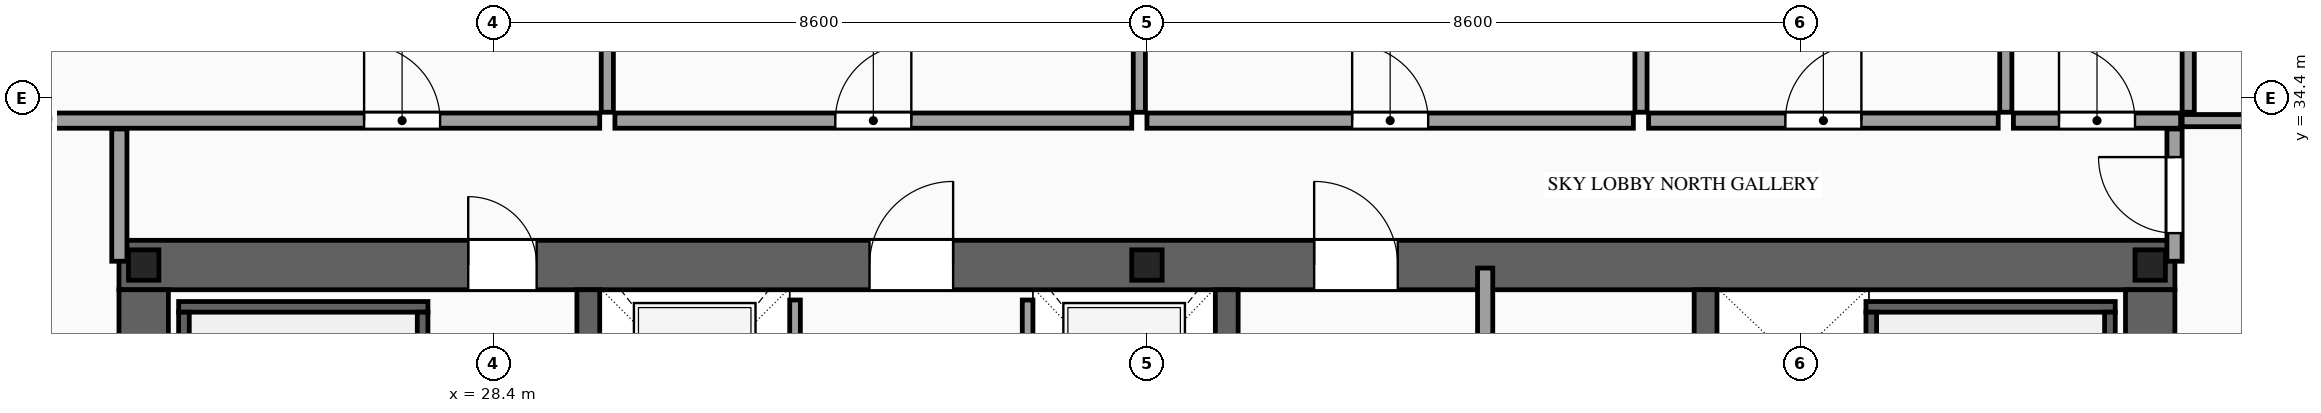
"""IFC4 building model, lengths in metres.
Left out: names, types, materials, properties, quantities, classifications, styles, units other than length and angle.
Written with IfcOpenShell. Run it as: python <this file> out.ifc"""

import sys

from ifc_helpers import new_model, si_unit, direction, frame, frame_2d, origin, origin_2d, place, context, subcontext, project, spatial, rectangle, i_section, extrude, source, transform, mapped, element, fill, save


model = new_model("IFC4")
c1 = context("Model", 3, precision=1e-05, world=origin(), true_north=direction((0.0, 1.0)))
c2 = subcontext(c1, "Body", "Model", "MODEL_VIEW")
j1 = project(units=[si_unit("LENGTHUNIT", "METRE"), si_unit("PLANEANGLEUNIT", "RADIAN")], contexts=[c1])
p1 = place(None, origin())
s1 = spatial("IfcSite", under=j1, at=p1, CompositionType="ELEMENT")
p2 = place(p1, origin())
s2 = spatial("IfcBuilding", under=s1, at=p2, CompositionType="ELEMENT")
p3 = place(p2, frame((0.0, 0.0, 171.6)))
s3 = spatial("IfcBuildingStorey", under=s2, at=p3, CompositionType="ELEMENT", Elevation=171.6)
p4 = place(p3, frame((23.475, 32.2, 0.0), z_axis=(0.0, 0.0, 1.0), x_axis=(1.0, 0.0, 0.0)))
e1 = element("IfcWall", 1, at=p4, inside=s3, PredefinedType="SHEAR", context=c2, shape_type="SweptSolid", body=[
    extrude(rectangle(XDim=27.05, YDim=0.65, at=frame_2d((13.525, 0.0))), origin(), (0.0, 0.0, 1.0), 4.8),
])
p5 = place(p4, frame((4.595, 0.0, 0.0)))
e2 = element("IfcOpeningElement", 2, at=p5, cuts=e1, PredefinedType="OPENING", context=c2, shape_type="SweptSolid", body=[
    extrude(rectangle(XDim=0.9, YDim=2.15, at=frame_2d((0.45, 1.075))), frame((0.0, 0.34, 0.0), z_axis=(0.0, -1.0, 0.0), x_axis=(1.0, 0.0, 0.0)), (0.0, 0.0, 1.0), 0.68),
])
p6 = place(p4, frame((9.875, 0.0, 0.0)))
e3 = element("IfcOpeningElement", 3, at=p6, cuts=e1, PredefinedType="OPENING", context=c2, shape_type="SweptSolid", body=[
    extrude(rectangle(XDim=1.1, YDim=2.2, at=frame_2d((0.55, 1.1))), frame((0.0, 0.34, 0.0), z_axis=(0.0, -1.0, 0.0), x_axis=(1.0, 0.0, 0.0)), (0.0, 0.0, 1.0), 0.68),
])
p7 = place(p4, frame((15.725, 0.0, 0.0)))
e4 = element("IfcOpeningElement", 4, at=p7, cuts=e1, PredefinedType="OPENING", context=c2, shape_type="SweptSolid", body=[
    extrude(rectangle(XDim=1.1, YDim=2.2, at=frame_2d((0.55, 1.1))), frame((0.0, 0.34, 0.0), z_axis=(0.0, -1.0, 0.0), x_axis=(1.0, 0.0, 0.0)), (0.0, 0.0, 1.0), 0.68),
])
m1 = source(origin(), c2, "Body", "SweptSolid", [
    extrude(rectangle(XDim=12.15, YDim=0.65, at=frame_2d((6.075, 0.0))), origin(), (0.0, 0.0, 1.0), 4.8),
])
for number, where, z_axis, x_axis in (
    (5, (23.8, 19.725, 0.0), (0.0, 0.0, 1.0), (0.0, 1.0, 0.0)),
    (6, (50.2, 19.725, 0.0), (0.0, 0.0, 1.0), (0.0, 1.0, 0.0)),
):
    element("IfcWall", number, at=place(p3, frame(where, z_axis=z_axis, x_axis=x_axis)), inside=s3, PredefinedType="SHEAR", context=c2, shape_type="MappedRepresentation", body=[
        mapped(m1, transform((0.0, 0.0, 0.0), scale=1.0)),
    ])
m2 = source(origin(), c2, "Body", "SweptSolid", [
    extrude(rectangle(XDim=12.15, YDim=0.3, at=frame_2d((6.075, 0.0))), origin(), (0.0, 0.0, 1.0), 4.8),
])
for number, where, z_axis, x_axis in (
    (7, (29.65, 19.725, 0.0), (0.0, 0.0, 1.0), (0.0, 1.0, 0.0)),
    (8, (38.05, 19.725, 0.0), (0.0, 0.0, 1.0), (0.0, 1.0, 0.0)),
    (9, (44.35, 19.725, 0.0), (0.0, 0.0, 1.0), (0.0, 1.0, 0.0)),
):
    element("IfcWall", number, at=place(p3, frame(where, z_axis=z_axis, x_axis=x_axis)), inside=s3, PredefinedType="SOLIDWALL", context=c2, shape_type="MappedRepresentation", body=[
        mapped(m2, transform((0.0, 0.0, 0.0), scale=1.0)),
    ])
m3 = source(origin(), c2, "Body", "SweptSolid", [
    extrude(i_section(OverallWidth=0.4, OverallDepth=0.4, WebThickness=0.013, FlangeThickness=0.021, at=origin_2d()), origin(), (0.0, 0.0, 1.0), 4.8),
])
for number, where, z_axis, x_axis in (
    (10, (23.8, 32.2, 0.0), (0.0, 0.0, 1.0), (1.0, 0.0, 0.0)),
    (11, (37.0, 32.2, 0.0), (0.0, 0.0, 1.0), (1.0, 0.0, 0.0)),
    (12, (50.2, 32.2, 0.0), (0.0, 0.0, 1.0), (1.0, 0.0, 0.0)),
):
    element("IfcColumn", number, at=place(p3, frame(where, z_axis=z_axis, x_axis=x_axis)), inside=s3, PredefinedType="COLUMN", context=c2, shape_type="MappedRepresentation", body=[
        mapped(m3, transform((0.0, 0.0, 0.0), scale=1.0)),
    ])
p8 = place(p3, frame((32.37, 29.4, 0.0), z_axis=(0.0, 0.0, 1.0), x_axis=(0.0, 1.0, 0.0)))
e13 = element("IfcWall", 13, at=p8, inside=s3, PredefinedType="SOLIDWALL", context=c2, shape_type="SweptSolid", body=[
    extrude(rectangle(XDim=2.34, YDim=0.14, at=frame_2d((1.17, 0.0))), origin(), (0.0, 0.0, 1.0), 4.52),
])
p9 = place(p8, frame((0.62, 0.0, 0.0)))
e14 = element("IfcOpeningElement", 14, at=p9, cuts=e13, PredefinedType="OPENING", context=c2, shape_type="SweptSolid", body=[
    extrude(rectangle(XDim=1.1, YDim=2.2, at=frame_2d((0.55, 1.1))), frame((0.0, 0.085, 0.0), z_axis=(0.0, -1.0, 0.0), x_axis=(1.0, 0.0, 0.0)), (0.0, 0.0, 1.0), 0.17),
])
p10 = place(p3, frame((35.43, 29.4, 0.0), z_axis=(0.0, 0.0, 1.0), x_axis=(0.0, 1.0, 0.0)))
e15 = element("IfcWall", 15, at=p10, inside=s3, PredefinedType="SOLIDWALL", context=c2, shape_type="SweptSolid", body=[
    extrude(rectangle(XDim=2.34, YDim=0.14, at=frame_2d((1.17, 0.0))), origin(), (0.0, 0.0, 1.0), 4.52),
])
p11 = place(p10, frame((0.62, 0.0, 0.0)))
e16 = element("IfcOpeningElement", 16, at=p11, cuts=e15, PredefinedType="OPENING", context=c2, shape_type="SweptSolid", body=[
    extrude(rectangle(XDim=1.1, YDim=2.2, at=frame_2d((0.55, 1.1))), frame((0.0, 0.085, 0.0), z_axis=(0.0, -1.0, 0.0), x_axis=(1.0, 0.0, 0.0)), (0.0, 0.0, 1.0), 0.17),
])
m4 = source(origin(), c2, "Body", "SweptSolid", [
    extrude(rectangle(XDim=3.28, YDim=0.14, at=frame_2d((1.64, 0.0))), origin(), (0.0, 0.0, 1.0), 4.52),
])
p12 = place(p3, frame((24.26, 31.65, 0.0), z_axis=(0.0, 0.0, 1.0), x_axis=(1.0, 0.0, 0.0)))
e17 = element("IfcWall", 17, at=p12, inside=s3, PredefinedType="SOLIDWALL", context=c2, shape_type="MappedRepresentation", body=[
    mapped(m4, transform((0.0, 0.0, 0.0), scale=1.0)),
])
m5 = source(origin(), c2, "Body", "SweptSolid", [
    extrude(rectangle(XDim=8.94, YDim=0.14, at=frame_2d((4.47, 0.0))), origin(), (0.0, 0.0, 1.0), 4.52),
])
for number, where, z_axis, x_axis in (
    (18, (24.33, 22.64, 0.0), (0.0, 0.0, 1.0), (0.0, 1.0, 0.0)),
    (19, (27.47, 22.64, 0.0), (0.0, 0.0, 1.0), (0.0, 1.0, 0.0)),
):
    element("IfcWall", number, at=place(p3, frame(where, z_axis=z_axis, x_axis=x_axis)), inside=s3, PredefinedType="SOLIDWALL", context=c2, shape_type="MappedRepresentation", body=[
        mapped(m5, transform((0.0, 0.0, 0.0), scale=1.0)),
    ])
p13 = place(p3, frame((46.46, 31.65, 0.0), z_axis=(0.0, 0.0, 1.0), x_axis=(1.0, 0.0, 0.0)))
e20 = element("IfcWall", 20, at=p13, inside=s3, PredefinedType="SOLIDWALL", context=c2, shape_type="MappedRepresentation", body=[
    mapped(m4, transform((0.0, 0.0, 0.0), scale=1.0)),
])
for number, where, z_axis, x_axis in (
    (21, (46.53, 22.64, 0.0), (0.0, 0.0, 1.0), (0.0, 1.0, 0.0)),
    (22, (49.67, 22.64, 0.0), (0.0, 0.0, 1.0), (0.0, 1.0, 0.0)),
):
    element("IfcWall", number, at=place(p3, frame(where, z_axis=z_axis, x_axis=x_axis)), inside=s3, PredefinedType="SOLIDWALL", context=c2, shape_type="MappedRepresentation", body=[
        mapped(m5, transform((0.0, 0.0, 0.0), scale=1.0)),
    ])
m6 = source(origin(), c2, "Body", "SweptSolid", [
    extrude(rectangle(XDim=12.72, YDim=0.2, at=frame_2d((6.36, 0.0))), origin(), (0.0, 0.0, 1.0), 4.52),
])
p14 = place(p3, frame((41.45, 19.44, 0.0), z_axis=(0.0, 0.0, 1.0), x_axis=(0.0, 1.0, 0.0)))
e23 = element("IfcWall", 23, at=p14, inside=s3, PredefinedType="PARTITIONING", context=c2, shape_type="MappedRepresentation", body=[
    mapped(m6, transform((0.0, 0.0, 0.0), scale=1.0)),
])
m7 = source(origin(), c2, "Body", "SweptSolid", [
    extrude(rectangle(XDim=1.74, YDim=0.2, at=frame_2d((0.87, 0.0))), origin(), (0.0, 0.0, 1.0), 4.52),
])
p15 = place(p3, frame((23.48, 32.25, 0.0), z_axis=(0.0, 0.0, 1.0), x_axis=(0.0, 1.0, 0.0)))
e24 = element("IfcWall", 24, at=p15, inside=s3, PredefinedType="PARTITIONING", context=c2, shape_type="MappedRepresentation", body=[
    mapped(m7, transform((0.0, 0.0, 0.0), scale=1.0)),
])
p16 = place(p3, frame((50.52, 32.25, 0.0), z_axis=(0.0, 0.0, 1.0), x_axis=(0.0, 1.0, 0.0)))
e25 = element("IfcWall", 25, at=p16, inside=s3, PredefinedType="PARTITIONING", context=c2, shape_type="SweptSolid", body=[
    extrude(rectangle(XDim=1.74, YDim=0.2, at=frame_2d((0.87, 0.0))), origin(), (0.0, 0.0, 1.0), 4.52),
])
p17 = place(p16, frame((0.37, 0.0, 0.0)))
e26 = element("IfcOpeningElement", 26, at=p17, cuts=e25, PredefinedType="OPENING", context=c2, shape_type="SweptSolid", body=[
    extrude(rectangle(XDim=1.0, YDim=2.2, at=frame_2d((0.5, 1.1))), frame((0.0, 0.115, 0.0), z_axis=(0.0, -1.0, 0.0), x_axis=(1.0, 0.0, 0.0)), (0.0, 0.0, 1.0), 0.23),
])
m8 = source(origin(), c2, "Body", "SweptSolid", [
    extrude(rectangle(XDim=8.33, YDim=0.16, at=frame_2d((4.165, 0.0))), origin(), (0.0, 0.0, 1.0), 4.52),
])
p18 = place(p3, frame((50.62, 34.1, 0.0), z_axis=(0.0, 0.0, 1.0), x_axis=(1.0, 0.0, 0.0)))
e27 = element("IfcWall", 27, at=p18, inside=s3, PredefinedType="PARTITIONING", context=c2, shape_type="MappedRepresentation", body=[
    mapped(m8, transform((0.0, 0.0, 0.0), scale=1.0)),
])
p19 = place(p3, frame((17.94, 34.1, 0.0), z_axis=(0.0, 0.0, 1.0), x_axis=(1.0, 0.0, 0.0)))
e28 = element("IfcWall", 28, at=p19, inside=s3, PredefinedType="PARTITIONING", context=c2, shape_type="SweptSolid", body=[
    extrude(rectangle(XDim=11.86, YDim=0.2, at=frame_2d((5.93, 0.0))), origin(), (0.0, 0.0, 1.0), 4.52),
])
p20 = place(p19, frame((8.76, 0.0, 0.0)))
e29 = element("IfcOpeningElement", 29, at=p20, cuts=e28, PredefinedType="OPENING", context=c2, shape_type="SweptSolid", body=[
    extrude(rectangle(XDim=1.0, YDim=2.2, at=frame_2d((0.5, 1.1))), frame((0.0, 0.115, 0.0), z_axis=(0.0, -1.0, 0.0), x_axis=(1.0, 0.0, 0.0)), (0.0, 0.0, 1.0), 0.23),
])
m9 = source(origin(), c2, "Body", "SweptSolid", [
    extrude(rectangle(XDim=13.54, YDim=0.16, at=frame_2d((6.77, 0.0))), origin(), (0.0, 0.0, 1.0), 4.52),
])
p21 = place(p3, frame((29.9, 34.21, 0.0), z_axis=(0.0, 0.0, 1.0), x_axis=(0.0, 1.0, 0.0)))
e30 = element("IfcWall", 30, at=p21, inside=s3, PredefinedType="PARTITIONING", context=c2, shape_type="MappedRepresentation", body=[
    mapped(m9, transform((0.0, 0.0, 0.0), scale=1.0)),
])
p22 = place(p3, frame((30.0, 34.1, 0.0), z_axis=(0.0, 0.0, 1.0), x_axis=(1.0, 0.0, 0.0)))
e31 = element("IfcWall", 31, at=p22, inside=s3, PredefinedType="PARTITIONING", context=c2, shape_type="SweptSolid", body=[
    extrude(rectangle(XDim=6.8, YDim=0.2, at=frame_2d((3.4, 0.0))), origin(), (0.0, 0.0, 1.0), 4.52),
])
p23 = place(p22, frame((2.9, 0.0, 0.0)))
e32 = element("IfcOpeningElement", 32, at=p23, cuts=e31, PredefinedType="OPENING", context=c2, shape_type="SweptSolid", body=[
    extrude(rectangle(XDim=1.0, YDim=2.2, at=frame_2d((0.5, 1.1))), frame((0.0, 0.115, 0.0), z_axis=(0.0, -1.0, 0.0), x_axis=(1.0, 0.0, 0.0)), (0.0, 0.0, 1.0), 0.23),
])
m10 = source(origin(), c2, "Body", "SweptSolid", [
    extrude(rectangle(XDim=13.54, YDim=0.16, at=frame_2d((6.77, 0.0))), origin(), (0.0, 0.0, 1.0), 3.927),
])
p24 = place(p3, frame((36.9, 34.21, 0.0), z_axis=(0.0, 0.0, 1.0), x_axis=(0.0, 1.0, 0.0)))
e33 = element("IfcWall", 33, at=p24, inside=s3, PredefinedType="PARTITIONING", context=c2, shape_type="MappedRepresentation", body=[
    mapped(m10, transform((0.0, 0.0, 0.0), scale=1.0)),
])
p25 = place(p3, frame((37.0, 34.1, 0.0), z_axis=(0.0, 0.0, 1.0), x_axis=(1.0, 0.0, 0.0)))
e34 = element("IfcWall", 34, at=p25, inside=s3, PredefinedType="PARTITIONING", context=c2, shape_type="SweptSolid", body=[
    extrude(rectangle(XDim=6.4, YDim=0.2, at=frame_2d((3.2, 0.0))), origin(), (0.0, 0.0, 1.0), 4.52),
])
p26 = place(p25, frame((2.7, 0.0, 0.0)))
e35 = element("IfcOpeningElement", 35, at=p26, cuts=e34, PredefinedType="OPENING", context=c2, shape_type="SweptSolid", body=[
    extrude(rectangle(XDim=1.0, YDim=2.2, at=frame_2d((0.5, 1.1))), frame((0.0, 0.115, 0.0), z_axis=(0.0, -1.0, 0.0), x_axis=(1.0, 0.0, 0.0)), (0.0, 0.0, 1.0), 0.23),
])
p27 = place(p3, frame((43.5, 34.21, 0.0), z_axis=(0.0, 0.0, 1.0), x_axis=(0.0, 1.0, 0.0)))
e36 = element("IfcWall", 36, at=p27, inside=s3, PredefinedType="PARTITIONING", context=c2, shape_type="MappedRepresentation", body=[
    mapped(m9, transform((0.0, 0.0, 0.0), scale=1.0)),
])
p28 = place(p3, frame((43.6, 34.1, 0.0), z_axis=(0.0, 0.0, 1.0), x_axis=(1.0, 0.0, 0.0)))
e37 = element("IfcWall", 37, at=p28, inside=s3, PredefinedType="PARTITIONING", context=c2, shape_type="SweptSolid", body=[
    extrude(rectangle(XDim=4.6, YDim=0.2, at=frame_2d((2.3, 0.0))), origin(), (0.0, 0.0, 1.0), 4.52),
])
p29 = place(p28, frame((1.8, 0.0, 0.0)))
e38 = element("IfcOpeningElement", 38, at=p29, cuts=e37, PredefinedType="OPENING", context=c2, shape_type="SweptSolid", body=[
    extrude(rectangle(XDim=1.0, YDim=2.2, at=frame_2d((0.5, 1.1))), frame((0.0, 0.115, 0.0), z_axis=(0.0, -1.0, 0.0), x_axis=(1.0, 0.0, 0.0)), (0.0, 0.0, 1.0), 0.23),
])
p30 = place(p3, frame((48.3, 34.21, 0.0), z_axis=(0.0, 0.0, 1.0), x_axis=(0.0, 1.0, 0.0)))
e39 = element("IfcWall", 39, at=p30, inside=s3, PredefinedType="PARTITIONING", context=c2, shape_type="MappedRepresentation", body=[
    mapped(m9, transform((0.0, 0.0, 0.0), scale=1.0)),
])
p31 = place(p3, frame((48.4, 34.1, 0.0), z_axis=(0.0, 0.0, 1.0), x_axis=(1.0, 0.0, 0.0)))
e40 = element("IfcWall", 40, at=p31, inside=s3, PredefinedType="PARTITIONING", context=c2, shape_type="SweptSolid", body=[
    extrude(rectangle(XDim=2.2, YDim=0.2, at=frame_2d((1.1, 0.0))), origin(), (0.0, 0.0, 1.0), 4.52),
])
p32 = place(p31, frame((0.6, 0.0, 0.0)))
e41 = element("IfcOpeningElement", 41, at=p32, cuts=e40, PredefinedType="OPENING", context=c2, shape_type="SweptSolid", body=[
    extrude(rectangle(XDim=1.0, YDim=2.2, at=frame_2d((0.5, 1.1))), frame((0.0, 0.115, 0.0), z_axis=(0.0, -1.0, 0.0), x_axis=(1.0, 0.0, 0.0)), (0.0, 0.0, 1.0), 0.23),
])
p33 = place(p3, frame((50.7, 34.21, 0.0), z_axis=(0.0, 0.0, 1.0), x_axis=(0.0, 1.0, 0.0)))
e42 = element("IfcWall", 42, at=p33, inside=s3, PredefinedType="PARTITIONING", context=c2, shape_type="MappedRepresentation", body=[
    mapped(m9, transform((0.0, 0.0, 0.0), scale=1.0)),
])
m11 = source(origin(), c2, "Body", "SweptSolid", [
    extrude(rectangle(XDim=0.9, YDim=2.15, at=frame_2d((0.45, 1.075))), frame((0.0, 0.025, 0.0), z_axis=(0.0, -1.0, 0.0), x_axis=(1.0, 0.0, 0.0)), (0.0, 0.0, 1.0), 0.05),
])
p34 = place(p5, origin())
e43 = element("IfcDoor", 43, at=p34, inside=s3, OperationType="SINGLE_SWING_LEFT", PredefinedType="DOOR", context=c2, shape_type="MappedRepresentation", body=[
    mapped(m11, transform((0.0, 0.0, 0.0), scale=1.0)),
])
fill(e2, e43)
m12 = source(origin(), c2, "Body", "SweptSolid", [
    extrude(rectangle(XDim=1.1, YDim=2.2, at=frame_2d((0.55, 1.1))), frame((0.0, 0.025, 0.0), z_axis=(0.0, -1.0, 0.0), x_axis=(1.0, 0.0, 0.0)), (0.0, 0.0, 1.0), 0.05),
])
p35 = place(p6, origin())
e44 = element("IfcDoor", 44, at=p35, inside=s3, OperationType="SINGLE_SWING_RIGHT", PredefinedType="DOOR", context=c2, shape_type="MappedRepresentation", body=[
    mapped(m12, transform((0.0, 0.0, 0.0), scale=1.0)),
])
fill(e3, e44)
p36 = place(p7, origin())
e45 = element("IfcDoor", 45, at=p36, inside=s3, OperationType="SINGLE_SWING_LEFT", PredefinedType="DOOR", context=c2, shape_type="MappedRepresentation", body=[
    mapped(m12, transform((0.0, 0.0, 0.0), scale=1.0)),
])
fill(e4, e45)
m13 = source(origin(), c2, "Body", "SweptSolid", [
    extrude(rectangle(XDim=1.0, YDim=2.2, at=frame_2d((0.5, 1.1))), frame((0.0, 0.025, 0.0), z_axis=(0.0, -1.0, 0.0), x_axis=(1.0, 0.0, 0.0)), (0.0, 0.0, 1.0), 0.05),
])
p37 = place(p17, origin())
e46 = element("IfcDoor", 46, at=p37, inside=s3, OperationType="SINGLE_SWING_RIGHT", PredefinedType="DOOR", context=c2, shape_type="MappedRepresentation", body=[
    mapped(m13, transform((0.0, 0.0, 0.0), scale=1.0)),
])
fill(e26, e46)
p38 = place(p20, origin())
e47 = element("IfcDoor", 47, at=p38, inside=s3, OperationType="SINGLE_SWING_LEFT", PredefinedType="DOOR", context=c2, shape_type="MappedRepresentation", body=[
    mapped(m13, transform((0.0, 0.0, 0.0), scale=1.0)),
])
fill(e29, e47)
p39 = place(p23, origin())
e48 = element("IfcDoor", 48, at=p39, inside=s3, OperationType="SINGLE_SWING_RIGHT", PredefinedType="DOOR", context=c2, shape_type="MappedRepresentation", body=[
    mapped(m13, transform((0.0, 0.0, 0.0), scale=1.0)),
])
fill(e32, e48)
p40 = place(p26, origin())
e49 = element("IfcDoor", 49, at=p40, inside=s3, OperationType="SINGLE_SWING_LEFT", PredefinedType="DOOR", context=c2, shape_type="MappedRepresentation", body=[
    mapped(m13, transform((0.0, 0.0, 0.0), scale=1.0)),
])
fill(e35, e49)
p41 = place(p29, origin())
e50 = element("IfcDoor", 50, at=p41, inside=s3, OperationType="SINGLE_SWING_RIGHT", PredefinedType="DOOR", context=c2, shape_type="MappedRepresentation", body=[
    mapped(m13, transform((0.0, 0.0, 0.0), scale=1.0)),
])
fill(e38, e50)
p42 = place(p32, origin())
e51 = element("IfcDoor", 51, at=p42, inside=s3, OperationType="SINGLE_SWING_LEFT", PredefinedType="DOOR", context=c2, shape_type="MappedRepresentation", body=[
    mapped(m13, transform((0.0, 0.0, 0.0), scale=1.0)),
])
fill(e41, e51)
save(model, sys.argv[1])
